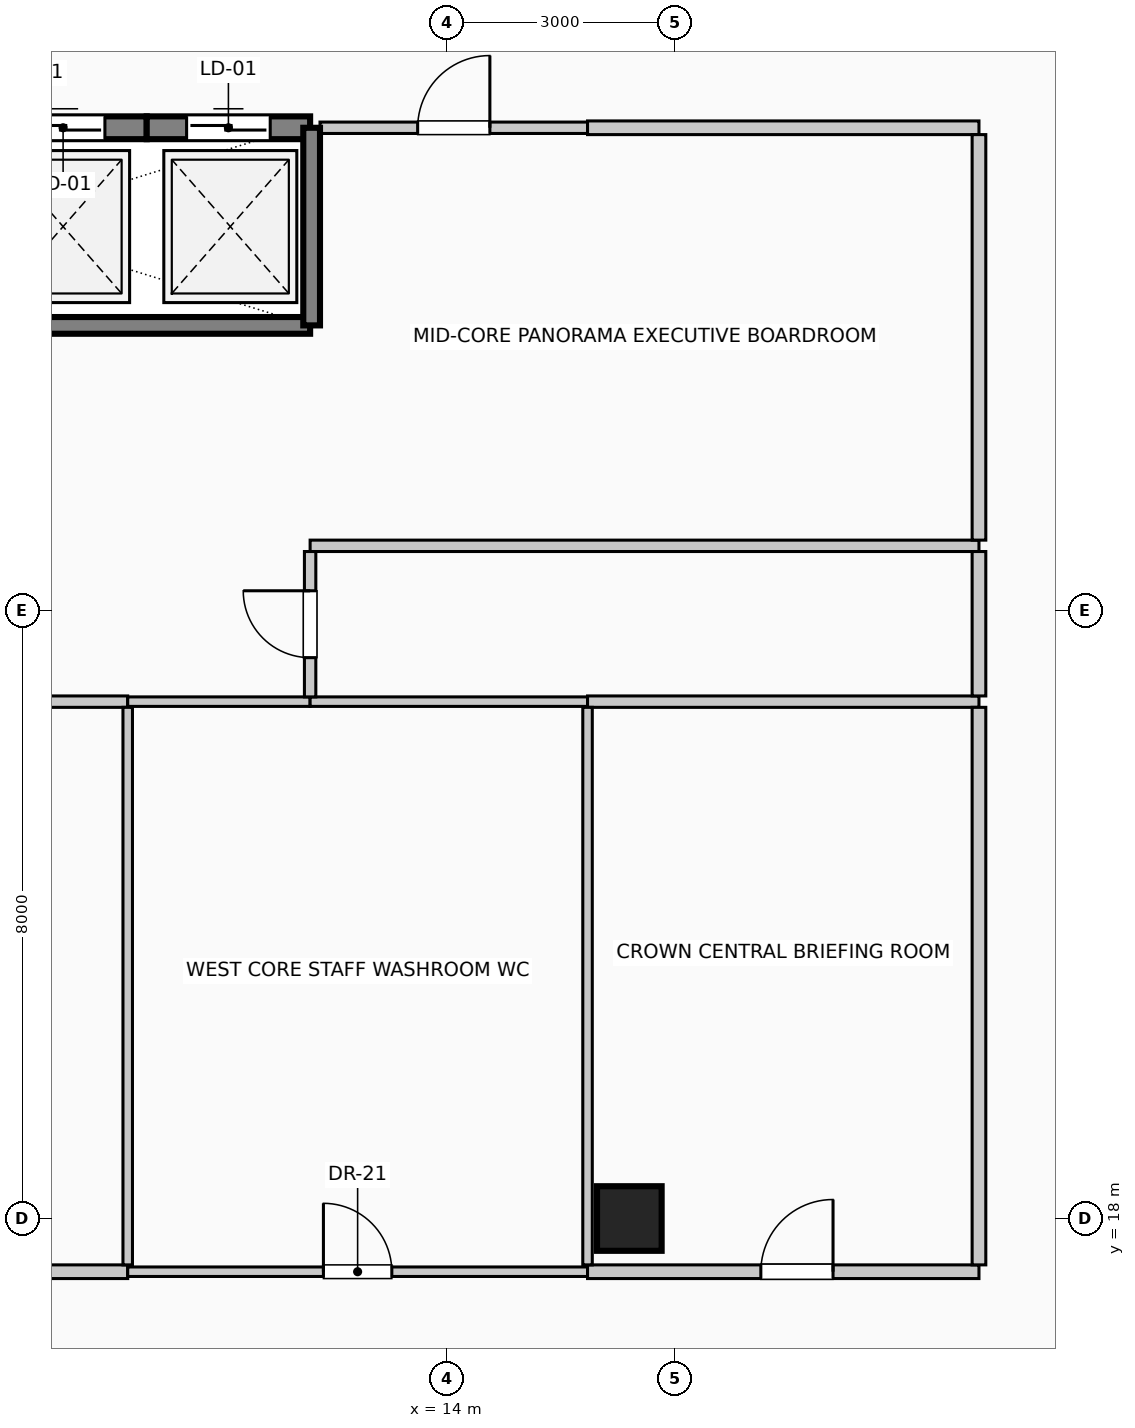
"""IFC4 building model, lengths in metres.
Left out: names, types, materials, properties, quantities, classifications, styles, units other than length and angle.
Written with IfcOpenShell. Run it as: python <this file> out.ifc"""

import sys

from ifc_helpers import new_model, si_unit, direction, frame, frame_2d, origin, origin_2d, place, context, subcontext, project, spatial, rectangle, circle, extrude, element, fill, save


model = new_model("IFC4")
c1 = context("Model", 3, precision=1e-05, world=origin(), true_north=direction((0.0, 1.0)))
c2 = subcontext(c1, "Body", "Model", "MODEL_VIEW")
j1 = project(units=[si_unit("LENGTHUNIT", "METRE"), si_unit("PLANEANGLEUNIT", "RADIAN")], contexts=[c1])
p1 = place(None, origin())
s1 = spatial("IfcSite", under=j1, at=p1, CompositionType="ELEMENT")
p2 = place(p1, origin())
s2 = spatial("IfcBuilding", under=s1, at=p2, CompositionType="ELEMENT")
p3 = place(p2, frame((0.0, 0.0, 289.0)))
s3 = spatial("IfcBuildingStorey", under=s2, at=p3, CompositionType="ELEMENT", Elevation=289.0)
p4 = place(p3, frame((16.4, 18.0, 0.0), z_axis=(0.0, 0.0, 1.0), x_axis=(1.0, 0.0, 0.0)))
e1 = element("IfcColumn", 1, at=p4, inside=s3, PredefinedType="COLUMN", context=c2, shape_type="SweptSolid", body=[
    extrude(circle(Radius=0.425, at=origin_2d()), origin(), (0.0, 0.0, 1.0), 4.0),
])
p5 = place(p3, frame((7.85, 32.35, 0.0), z_axis=(0.0, 0.0, 1.0), x_axis=(1.0, 0.0, 0.0)))
e2 = element("IfcWall", 2, at=p5, inside=s3, PredefinedType="SOLIDWALL", context=c2, shape_type="SweptSolid", body=[
    extrude(rectangle(XDim=2.2, YDim=0.3, at=frame_2d((1.1, 0.0))), origin(), (0.0, 0.0, 1.0), 4.0),
])
p6 = place(p5, frame((0.55, 0.0, 0.0)))
e3 = element("IfcOpeningElement", 3, at=p6, cuts=e2, PredefinedType="OPENING", context=c2, shape_type="SweptSolid", body=[
    extrude(rectangle(XDim=1.1, YDim=2.2, at=frame_2d((0.55, 1.1))), frame((0.0, 0.16, 0.0), z_axis=(0.0, -1.0, 0.0), x_axis=(1.0, 0.0, 0.0)), (0.0, 0.0, 1.0), 0.32),
])
p7 = place(p3, frame((10.05, 32.35, 0.0), z_axis=(0.0, 0.0, 1.0), x_axis=(1.0, 0.0, 0.0)))
e4 = element("IfcWall", 4, at=p7, inside=s3, PredefinedType="SOLIDWALL", context=c2, shape_type="SweptSolid", body=[
    extrude(rectangle(XDim=2.15, YDim=0.3, at=frame_2d((1.075, 0.0))), origin(), (0.0, 0.0, 1.0), 4.0),
])
p8 = place(p7, frame((0.525, 0.0, 0.0)))
e5 = element("IfcOpeningElement", 5, at=p8, cuts=e4, PredefinedType="OPENING", context=c2, shape_type="SweptSolid", body=[
    extrude(rectangle(XDim=1.1, YDim=2.2, at=frame_2d((0.55, 1.1))), frame((0.0, 0.16, 0.0), z_axis=(0.0, -1.0, 0.0), x_axis=(1.0, 0.0, 0.0)), (0.0, 0.0, 1.0), 0.32),
])
p9 = place(p3, frame((3.55, 29.75, 0.0), z_axis=(0.0, 0.0, 1.0), x_axis=(1.0, 0.0, 0.0)))
e6 = element("IfcWall", 6, at=p9, inside=s3, PredefinedType="SOLIDWALL", context=c2, shape_type="SweptSolid", body=[
    extrude(rectangle(XDim=8.65, YDim=0.22, at=frame_2d((4.325, 0.0))), origin(), (0.0, 0.0, 1.0), 4.0),
])
p10 = place(p3, frame((12.22, 29.75, 0.0), z_axis=(0.0, 0.0, 1.0), x_axis=(0.0, 1.0, 0.0)))
e7 = element("IfcWall", 7, at=p10, inside=s3, PredefinedType="SOLIDWALL", context=c2, shape_type="SweptSolid", body=[
    extrude(rectangle(XDim=2.6, YDim=0.22, at=frame_2d((1.3, 0.0))), origin(), (0.0, 0.0, 1.0), 4.0),
])
p11 = place(p3, frame((3.55, 17.3, 0.0), z_axis=(0.0, 0.0, 1.0), x_axis=(1.0, 0.0, 0.0)))
e8 = element("IfcWall", 8, at=p11, inside=s3, PredefinedType="PARTITIONING", context=c2, shape_type="SweptSolid", body=[
    extrude(rectangle(XDim=6.25, YDim=0.18, at=frame_2d((3.125, 0.0))), origin(), (0.0, 0.0, 1.0), 3.775),
])
p12 = place(p11, frame((2.65, 0.0, 0.0)))
e9 = element("IfcOpeningElement", 9, at=p12, cuts=e8, PredefinedType="OPENING", context=c2, shape_type="SweptSolid", body=[
    extrude(rectangle(XDim=0.95, YDim=2.15, at=frame_2d((0.475, 1.075))), frame((0.0, 0.1, 0.0), z_axis=(0.0, -1.0, 0.0), x_axis=(1.0, 0.0, 0.0)), (0.0, 0.0, 1.0), 0.2),
])
p13 = place(p3, frame((9.8, 17.3, 0.0), z_axis=(0.0, 0.0, 1.0), x_axis=(1.0, 0.0, 0.0)))
e10 = element("IfcWall", 10, at=p13, inside=s3, PredefinedType="PARTITIONING", context=c2, shape_type="SweptSolid", body=[
    extrude(rectangle(XDim=6.05, YDim=0.125, at=frame_2d((3.025, 0.0))), origin(), (0.0, 0.0, 1.0), 3.775),
])
p14 = place(p13, frame((2.575, 0.0, 0.0)))
e11 = element("IfcOpeningElement", 11, at=p14, cuts=e10, PredefinedType="OPENING", context=c2, shape_type="SweptSolid", body=[
    extrude(rectangle(XDim=0.9, YDim=2.1, at=frame_2d((0.45, 1.05))), frame((0.0, 0.073, 0.0), z_axis=(0.0, -1.0, 0.0), x_axis=(1.0, 0.0, 0.0)), (0.0, 0.0, 1.0), 0.145),
])
p15 = place(p3, frame((15.85, 17.3, 0.0), z_axis=(0.0, 0.0, 1.0), x_axis=(1.0, 0.0, 0.0)))
e12 = element("IfcWall", 12, at=p15, inside=s3, PredefinedType="PARTITIONING", context=c2, shape_type="SweptSolid", body=[
    extrude(rectangle(XDim=5.15, YDim=0.18, at=frame_2d((2.575, 0.0))), origin(), (0.0, 0.0, 1.0), 3.775),
])
p16 = place(p15, frame((2.28, 0.0, 0.0)))
e13 = element("IfcOpeningElement", 13, at=p16, cuts=e12, PredefinedType="OPENING", context=c2, shape_type="SweptSolid", body=[
    extrude(rectangle(XDim=0.95, YDim=2.15, at=frame_2d((0.475, 1.075))), frame((0.0, 0.1, 0.0), z_axis=(0.0, -1.0, 0.0), x_axis=(1.0, 0.0, 0.0)), (0.0, 0.0, 1.0), 0.2),
])
p17 = place(p3, frame((3.55, 24.8, 0.0), z_axis=(0.0, 0.0, 1.0), x_axis=(1.0, 0.0, 0.0)))
e14 = element("IfcWall", 14, at=p17, inside=s3, PredefinedType="PARTITIONING", context=c2, shape_type="SweptSolid", body=[
    extrude(rectangle(XDim=6.25, YDim=0.15, at=frame_2d((3.125, 0.0))), origin(), (0.0, 0.0, 1.0), 3.775),
])
p18 = place(p3, frame((9.8, 24.8, 0.0), z_axis=(0.0, 0.0, 1.0), x_axis=(1.0, 0.0, 0.0)))
e15 = element("IfcWall", 15, at=p18, inside=s3, PredefinedType="PARTITIONING", context=c2, shape_type="SweptSolid", body=[
    extrude(rectangle(XDim=2.4, YDim=0.125, at=frame_2d((1.2, 0.0))), origin(), (0.0, 0.0, 1.0), 3.775),
])
p19 = place(p3, frame((12.2, 24.8, 0.0), z_axis=(0.0, 0.0, 1.0), x_axis=(1.0, 0.0, 0.0)))
e16 = element("IfcWall", 16, at=p19, inside=s3, PredefinedType="PARTITIONING", context=c2, shape_type="SweptSolid", body=[
    extrude(rectangle(XDim=3.65, YDim=0.125, at=frame_2d((1.825, 0.0))), origin(), (0.0, 0.0, 1.0), 3.775),
])
p20 = place(p3, frame((15.85, 24.8, 0.0), z_axis=(0.0, 0.0, 1.0), x_axis=(1.0, 0.0, 0.0)))
e17 = element("IfcWall", 17, at=p20, inside=s3, PredefinedType="PARTITIONING", context=c2, shape_type="SweptSolid", body=[
    extrude(rectangle(XDim=5.15, YDim=0.15, at=frame_2d((2.575, 0.0))), origin(), (0.0, 0.0, 1.0), 3.775),
])
p21 = place(p3, frame((12.2, 26.85, 0.0), z_axis=(0.0, 0.0, 1.0), x_axis=(1.0, 0.0, 0.0)))
e18 = element("IfcWall", 18, at=p21, inside=s3, PredefinedType="PARTITIONING", context=c2, shape_type="SweptSolid", body=[
    extrude(rectangle(XDim=8.8, YDim=0.15, at=frame_2d((4.4, 0.0))), origin(), (0.0, 0.0, 1.0), 3.775),
])
p22 = place(p3, frame((12.33, 32.35, 0.0), z_axis=(0.0, 0.0, 1.0), x_axis=(1.0, 0.0, 0.0)))
e19 = element("IfcWall", 19, at=p22, inside=s3, PredefinedType="PARTITIONING", context=c2, shape_type="SweptSolid", body=[
    extrude(rectangle(XDim=3.52, YDim=0.15, at=frame_2d((1.76, 0.0))), origin(), (0.0, 0.0, 1.0), 3.775),
])
p23 = place(p22, frame((1.285, 0.0, 0.0)))
e20 = element("IfcOpeningElement", 20, at=p23, cuts=e19, PredefinedType="OPENING", context=c2, shape_type="SweptSolid", body=[
    extrude(rectangle(XDim=0.95, YDim=2.15, at=frame_2d((0.475, 1.075))), frame((0.0, 0.085, 0.0), z_axis=(0.0, -1.0, 0.0), x_axis=(1.0, 0.0, 0.0)), (0.0, 0.0, 1.0), 0.17),
])
p24 = place(p3, frame((15.85, 32.35, 0.0), z_axis=(0.0, 0.0, 1.0), x_axis=(1.0, 0.0, 0.0)))
e21 = element("IfcWall", 21, at=p24, inside=s3, PredefinedType="PARTITIONING", context=c2, shape_type="SweptSolid", body=[
    extrude(rectangle(XDim=5.15, YDim=0.18, at=frame_2d((2.575, 0.0))), origin(), (0.0, 0.0, 1.0), 3.775),
])
p25 = place(p3, frame((9.8, 17.39, 0.0), z_axis=(0.0, 0.0, 1.0), x_axis=(0.0, 1.0, 0.0)))
e22 = element("IfcWall", 22, at=p25, inside=s3, PredefinedType="PARTITIONING", context=c2, shape_type="SweptSolid", body=[
    extrude(rectangle(XDim=7.335, YDim=0.125, at=frame_2d((3.667, 0.0))), origin(), (0.0, 0.0, 1.0), 3.775),
])
p26 = place(p3, frame((12.2, 24.863, 0.0), z_axis=(0.0, 0.0, 1.0), x_axis=(0.0, 1.0, 0.0)))
e23 = element("IfcWall", 23, at=p26, inside=s3, PredefinedType="PARTITIONING", context=c2, shape_type="SweptSolid", body=[
    extrude(rectangle(XDim=1.912, YDim=0.15, at=frame_2d((0.956, 0.0))), origin(), (0.0, 0.0, 1.0), 3.775),
])
p27 = place(p26, frame((0.516, 0.0, 0.0)))
e24 = element("IfcOpeningElement", 24, at=p27, cuts=e23, PredefinedType="OPENING", context=c2, shape_type="SweptSolid", body=[
    extrude(rectangle(XDim=0.88, YDim=2.1, at=frame_2d((0.44, 1.05))), frame((0.0, 0.085, 0.0), z_axis=(0.0, -1.0, 0.0), x_axis=(1.0, 0.0, 0.0)), (0.0, 0.0, 1.0), 0.17),
])
p28 = place(p3, frame((15.85, 17.39, 0.0), z_axis=(0.0, 0.0, 1.0), x_axis=(0.0, 1.0, 0.0)))
e25 = element("IfcWall", 25, at=p28, inside=s3, PredefinedType="PARTITIONING", context=c2, shape_type="SweptSolid", body=[
    extrude(rectangle(XDim=7.335, YDim=0.125, at=frame_2d((3.667, 0.0))), origin(), (0.0, 0.0, 1.0), 3.775),
])
p29 = place(p3, frame((21.0, 17.39, 0.0), z_axis=(0.0, 0.0, 1.0), x_axis=(0.0, 1.0, 0.0)))
e26 = element("IfcWall", 26, at=p29, inside=s3, PredefinedType="PARTITIONING", context=c2, shape_type="SweptSolid", body=[
    extrude(rectangle(XDim=7.335, YDim=0.18, at=frame_2d((3.667, 0.0))), origin(), (0.0, 0.0, 1.0), 3.775),
])
p30 = place(p3, frame((21.0, 24.875, 0.0), z_axis=(0.0, 0.0, 1.0), x_axis=(0.0, 1.0, 0.0)))
e27 = element("IfcWall", 27, at=p30, inside=s3, PredefinedType="PARTITIONING", context=c2, shape_type="SweptSolid", body=[
    extrude(rectangle(XDim=1.9, YDim=0.18, at=frame_2d((0.95, 0.0))), origin(), (0.0, 0.0, 1.0), 3.775),
])
p31 = place(p3, frame((21.0, 26.925, 0.0), z_axis=(0.0, 0.0, 1.0), x_axis=(0.0, 1.0, 0.0)))
e28 = element("IfcWall", 28, at=p31, inside=s3, PredefinedType="PARTITIONING", context=c2, shape_type="SweptSolid", body=[
    extrude(rectangle(XDim=5.335, YDim=0.18, at=frame_2d((2.667, 0.0))), origin(), (0.0, 0.0, 1.0), 3.775),
])
p32 = place(p6, origin())
e29 = element("IfcDoor", 29, at=p32, inside=s3, OperationType="SLIDING_TO_LEFT", PredefinedType="DOOR", context=c2, shape_type="SweptSolid", body=[
    extrude(rectangle(XDim=1.1, YDim=2.2, at=frame_2d((0.55, 1.1))), frame((0.0, 0.025, 0.0), z_axis=(0.0, -1.0, 0.0), x_axis=(1.0, 0.0, 0.0)), (0.0, 0.0, 1.0), 0.05),
])
fill(e3, e29)
p33 = place(p8, origin())
e30 = element("IfcDoor", 30, at=p33, inside=s3, OperationType="SLIDING_TO_RIGHT", PredefinedType="DOOR", context=c2, shape_type="SweptSolid", body=[
    extrude(rectangle(XDim=1.1, YDim=2.2, at=frame_2d((0.55, 1.1))), frame((0.0, 0.025, 0.0), z_axis=(0.0, -1.0, 0.0), x_axis=(1.0, 0.0, 0.0)), (0.0, 0.0, 1.0), 0.05),
])
fill(e5, e30)
p34 = place(p14, origin())
e31 = element("IfcDoor", 31, at=p34, inside=s3, OperationType="SINGLE_SWING_LEFT", PredefinedType="DOOR", context=c2, shape_type="SweptSolid", body=[
    extrude(rectangle(XDim=0.9, YDim=2.1, at=frame_2d((0.45, 1.05))), frame((0.0, 0.025, 0.0), z_axis=(0.0, -1.0, 0.0), x_axis=(1.0, 0.0, 0.0)), (0.0, 0.0, 1.0), 0.05),
])
fill(e11, e31)
p35 = place(p16, origin())
e32 = element("IfcDoor", 32, at=p35, inside=s3, OperationType="SINGLE_SWING_RIGHT", PredefinedType="DOOR", context=c2, shape_type="SweptSolid", body=[
    extrude(rectangle(XDim=0.95, YDim=2.15, at=frame_2d((0.475, 1.075))), frame((0.0, 0.025, 0.0), z_axis=(0.0, -1.0, 0.0), x_axis=(1.0, 0.0, 0.0)), (0.0, 0.0, 1.0), 0.05),
])
fill(e13, e32)
p36 = place(p23, origin())
e33 = element("IfcDoor", 33, at=p36, inside=s3, OperationType="SINGLE_SWING_RIGHT", PredefinedType="DOOR", context=c2, shape_type="SweptSolid", body=[
    extrude(rectangle(XDim=0.95, YDim=2.15, at=frame_2d((0.475, 1.075))), frame((0.0, 0.025, 0.0), z_axis=(0.0, -1.0, 0.0), x_axis=(1.0, 0.0, 0.0)), (0.0, 0.0, 1.0), 0.05),
])
fill(e20, e33)
p37 = place(p27, origin())
e34 = element("IfcDoor", 34, at=p37, inside=s3, OperationType="SINGLE_SWING_RIGHT", PredefinedType="DOOR", context=c2, shape_type="SweptSolid", body=[
    extrude(rectangle(XDim=0.88, YDim=2.1, at=frame_2d((0.44, 1.05))), frame((0.0, 0.025, 0.0), z_axis=(0.0, -1.0, 0.0), x_axis=(1.0, 0.0, 0.0)), (0.0, 0.0, 1.0), 0.05),
])
fill(e24, e34)
save(model, sys.argv[1])
